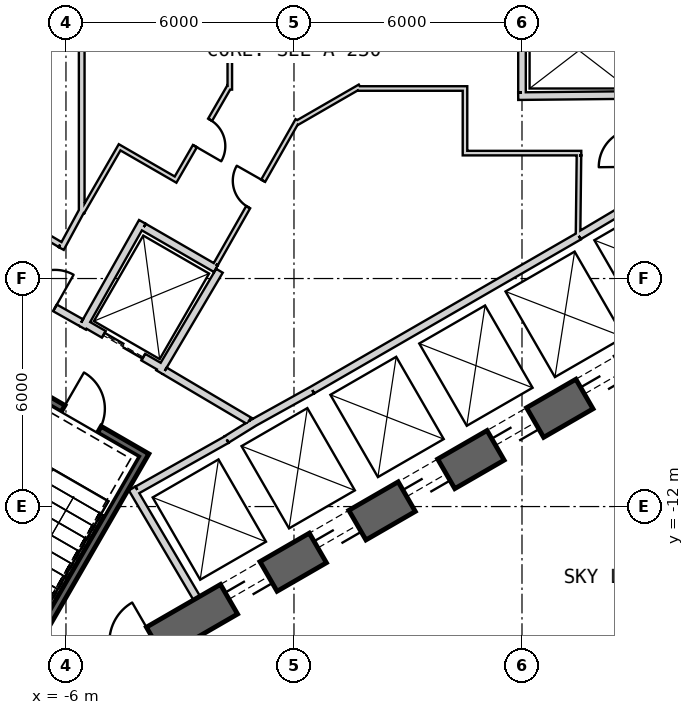
"""IFC4 building model, lengths in metres.
Left out: names, types, materials, properties, quantities, classifications, styles, units other than length and angle.
Written with IfcOpenShell. Run it as: python <this file> out.ifc"""

import sys

from ifc_helpers import new_model, si_unit, direction, frame, frame_2d, origin, place, context, subcontext, project, spatial, rectangle, extrude, element, fill, save


model = new_model("IFC4")
c1 = context("Model", 3, precision=1e-05, world=origin(), true_north=direction((0.0, 1.0)))
c2 = subcontext(c1, "Body", "Model", "MODEL_VIEW")
j1 = project(units=[si_unit("LENGTHUNIT", "METRE"), si_unit("PLANEANGLEUNIT", "RADIAN")], contexts=[c1])
p1 = place(None, origin())
s1 = spatial("IfcSite", under=j1, at=p1, CompositionType="ELEMENT")
p2 = place(p1, origin())
s2 = spatial("IfcBuilding", under=s1, at=p2, CompositionType="ELEMENT")
p3 = place(p2, frame((0.0, 0.0, 277.2)))
s3 = spatial("IfcBuildingStorey", under=s2, at=p3, CompositionType="ELEMENT", Elevation=277.2)
p4 = place(p3, frame((-7.825, -17.97, 0.0), z_axis=(0.0, 0.0, 1.0), x_axis=(0.866028369851, 0.499994862586, 0.0)))
e1 = element("IfcWall", 1, at=p4, inside=s3, PredefinedType="SHEAR", context=c2, shape_type="SweptSolid", body=[
    extrude(rectangle(XDim=31.523, YDim=0.9, at=frame_2d((15.762, 0.0))), origin(), (0.0, 0.0, 1.0), 6.5),
])
p5 = place(p4, frame((7.062, 0.0, 0.0)))
e2 = element("IfcOpeningElement", 2, at=p5, cuts=e1, PredefinedType="OPENING", context=c2, shape_type="SweptSolid", body=[
    extrude(rectangle(XDim=1.2, YDim=2.4, at=frame_2d((0.6, 1.2))), frame((0.0, 0.46, 0.0), z_axis=(0.0, -1.0, 0.0), x_axis=(1.0, 0.0, 0.0)), (0.0, 0.0, 1.0), 0.92),
])
p6 = place(p4, frame((9.762, 0.0, 0.0)))
e3 = element("IfcOpeningElement", 3, at=p6, cuts=e1, PredefinedType="OPENING", context=c2, shape_type="SweptSolid", body=[
    extrude(rectangle(XDim=1.2, YDim=2.4, at=frame_2d((0.6, 1.2))), frame((0.0, 0.46, 0.0), z_axis=(0.0, -1.0, 0.0), x_axis=(1.0, 0.0, 0.0)), (0.0, 0.0, 1.0), 0.92),
])
p7 = place(p4, frame((12.462, 0.0, 0.0)))
e4 = element("IfcOpeningElement", 4, at=p7, cuts=e1, PredefinedType="OPENING", context=c2, shape_type="SweptSolid", body=[
    extrude(rectangle(XDim=1.2, YDim=2.4, at=frame_2d((0.6, 1.2))), frame((0.0, 0.46, 0.0), z_axis=(0.0, -1.0, 0.0), x_axis=(1.0, 0.0, 0.0)), (0.0, 0.0, 1.0), 0.92),
])
p8 = place(p4, frame((15.162, 0.0, 0.0)))
e5 = element("IfcOpeningElement", 5, at=p8, cuts=e1, PredefinedType="OPENING", context=c2, shape_type="SweptSolid", body=[
    extrude(rectangle(XDim=1.2, YDim=2.4, at=frame_2d((0.6, 1.2))), frame((0.0, 0.46, 0.0), z_axis=(0.0, -1.0, 0.0), x_axis=(1.0, 0.0, 0.0)), (0.0, 0.0, 1.0), 0.92),
])
p9 = place(p4, frame((17.862, 0.0, 0.0)))
e6 = element("IfcOpeningElement", 6, at=p9, cuts=e1, PredefinedType="OPENING", context=c2, shape_type="SweptSolid", body=[
    extrude(rectangle(XDim=1.2, YDim=2.4, at=frame_2d((0.6, 1.2))), frame((0.0, 0.46, 0.0), z_axis=(0.0, -1.0, 0.0), x_axis=(1.0, 0.0, 0.0)), (0.0, 0.0, 1.0), 0.92),
])
p10 = place(p4, frame((20.562, 0.0, 0.0)))
e7 = element("IfcOpeningElement", 7, at=p10, cuts=e1, PredefinedType="OPENING", context=c2, shape_type="SweptSolid", body=[
    extrude(rectangle(XDim=1.2, YDim=2.4, at=frame_2d((0.6, 1.2))), frame((0.0, 0.46, 0.0), z_axis=(0.0, -1.0, 0.0), x_axis=(1.0, 0.0, 0.0)), (0.0, 0.0, 1.0), 0.92),
])
p11 = place(p4, frame((26.712, 0.0, 0.0)))
e8 = element("IfcOpeningElement", 8, at=p11, cuts=e1, PredefinedType="OPENING", context=c2, shape_type="SweptSolid", body=[
    extrude(rectangle(XDim=1.2, YDim=2.4, at=frame_2d((0.6, 1.2))), frame((0.0, 0.46, 0.0), z_axis=(0.0, -1.0, 0.0), x_axis=(1.0, 0.0, 0.0)), (0.0, 0.0, 1.0), 0.92),
])
p12 = place(p4, frame((3.612, 0.0, 0.0)))
e9 = element("IfcOpeningElement", 9, at=p12, cuts=e1, PredefinedType="OPENING", context=c2, shape_type="SweptSolid", body=[
    extrude(rectangle(XDim=1.2, YDim=2.4, at=frame_2d((0.6, 1.2))), frame((0.0, 0.46, 0.0), z_axis=(0.0, -1.0, 0.0), x_axis=(1.0, 0.0, 0.0)), (0.0, 0.0, 1.0), 0.92),
])
p13 = place(p3, frame((0.483, -8.936, 0.0), z_axis=(0.0, 0.0, 1.0), x_axis=(0.866030989016, 0.499990325971, 0.0)))
e10 = element("IfcWall", 10, at=p13, inside=s3, PredefinedType="PLUMBINGWALL", context=c2, shape_type="SweptSolid", body=[
    extrude(rectangle(XDim=8.1, YDim=0.2, at=frame_2d((4.05, 0.0))), origin(), (0.0, 0.0, 1.0), 6.1),
])
p14 = place(p3, frame((7.493, -4.878, 0.0), z_axis=(0.0, 0.0, 1.0), x_axis=(0.859981807212, 0.510324691999, 0.0)))
e11 = element("IfcWall", 11, at=p14, inside=s3, PredefinedType="PLUMBINGWALL", context=c2, shape_type="SweptSolid", body=[
    extrude(rectangle(XDim=1.845, YDim=0.2, at=frame_2d((0.922, 0.0))), origin(), (0.0, 0.0, 1.0), 6.1),
])
p15 = place(p3, frame((-2.558, -14.409, 0.0), z_axis=(0.0, 0.0, 1.0), x_axis=(-0.507997497166, 0.861358544901, 0.0)))
e12 = element("IfcWall", 12, at=p15, inside=s3, PredefinedType="PLUMBINGWALL", context=c2, shape_type="SweptSolid", body=[
    extrude(rectangle(XDim=3.35, YDim=0.2, at=frame_2d((1.675, 0.0))), origin(), (0.0, 0.0, 1.0), 6.1),
])
p16 = place(p3, frame((-1.769, -10.237, 0.0), z_axis=(0.0, 0.0, 1.0), x_axis=(-0.871534483978, -0.490334215854, 0.0)))
e13 = element("IfcWall", 13, at=p16, inside=s3, PredefinedType="PLUMBINGWALL", context=c2, shape_type="SweptSolid", body=[
    extrude(rectangle(XDim=2.7, YDim=0.2, at=frame_2d((1.35, 0.0))), origin(), (0.0, 0.0, 1.0), 6.1),
])
p17 = place(p3, frame((-1.024, -9.771, 0.0), z_axis=(0.0, 0.0, 1.0), x_axis=(-0.850348075135, -0.526220629693, 0.0)))
e14 = element("IfcWall", 14, at=p17, inside=s3, PredefinedType="PLUMBINGWALL", context=c2, shape_type="SweptSolid", body=[
    extrude(rectangle(XDim=0.878, YDim=0.2, at=frame_2d((0.439, 0.0))), origin(), (0.0, 0.0, 1.0), 6.1),
])
p18 = place(p3, frame((-1.13, -9.831, 0.0), z_axis=(0.0, 0.0, 1.0), x_axis=(0.874269620932, 0.485440655401, 0.0)))
e15 = element("IfcWall", 15, at=p18, inside=s3, PredefinedType="PLUMBINGWALL", context=c2, shape_type="SweptSolid", body=[
    extrude(rectangle(XDim=1.845, YDim=0.2, at=frame_2d((0.922, 0.0))), origin(), (0.0, 0.0, 1.0), 6.1),
])
p19 = place(p3, frame((5.9, -1.201, 0.0), z_axis=(0.0, 0.0, 1.0), x_axis=(0.999950064753, 0.009993397809, 0.0)))
e16 = element("IfcWall", 16, at=p19, inside=s3, PredefinedType="PLUMBINGWALL", context=c2, shape_type="SweptSolid", body=[
    extrude(rectangle(XDim=3.2, YDim=0.2, at=frame_2d((1.6, 0.0))), origin(), (0.0, 0.0, 1.0), 6.1),
])
p20 = place(p3, frame((6.0, -1.1, 0.0), z_axis=(0.0, 0.0, 1.0), x_axis=(0.0, 1.0, 0.0)))
e17 = element("IfcWall", 17, at=p20, inside=s3, PredefinedType="PLUMBINGWALL", context=c2, shape_type="SweptSolid", body=[
    extrude(rectangle(XDim=2.205, YDim=0.2, at=frame_2d((1.102, 0.0))), origin(), (0.0, 0.0, 1.0), 6.1),
])
p21 = place(p3, frame((-3.905, -10.563, -0.35), z_axis=(0.0, 0.0, 1.0), x_axis=(-0.500012932018, -0.866017937352, 0.0)))
e18 = element("IfcWall", 18, at=p21, inside=s3, PredefinedType="SHEAR", context=c2, shape_type="SweptSolid", body=[
    extrude(rectangle(XDim=8.1, YDim=0.2, at=frame_2d((4.05, 0.0))), origin(), (0.0, 0.0, 1.0), 6.45),
])
p22 = place(p3, frame((-4.041, -10.599, -0.35), z_axis=(0.0, 0.0, 1.0), x_axis=(-0.866047807691, 0.499961193289, 0.0)))
e19 = element("IfcWall", 19, at=p22, inside=s3, PredefinedType="SHEAR", context=c2, shape_type="SweptSolid", body=[
    extrude(rectangle(XDim=3.6, YDim=0.2, at=frame_2d((1.8, 0.0))), origin(), (0.0, 0.0, 1.0), 6.45),
])
p23 = place(p22, frame((1.25, 0.0, 0.35)))
e20 = element("IfcOpeningElement", 20, at=p23, cuts=e19, PredefinedType="OPENING", context=c2, shape_type="SweptSolid", body=[
    extrude(rectangle(XDim=1.1, YDim=2.1, at=frame_2d((0.55, 1.05))), frame((0.0, 0.11, 0.0), z_axis=(0.0, -1.0, 0.0), x_axis=(1.0, 0.0, 0.0)), (0.0, 0.0, 1.0), 0.22),
])
p24 = place(p3, frame((-3.446, -8.368, 0.0), z_axis=(0.0, 0.0, 1.0), x_axis=(-0.866024647952, 0.500001309137, 0.0)))
e21 = element("IfcWall", 21, at=p24, inside=s3, PredefinedType="PLUMBINGWALL", context=c2, shape_type="SweptSolid", body=[
    extrude(rectangle(XDim=2.4, YDim=0.2, at=frame_2d((1.2, 0.0))), origin(), (0.0, 0.0, 1.0), 6.1),
])
p25 = place(p24, frame((0.6, 0.0, 0.0)))
e22 = element("IfcOpeningElement", 22, at=p25, cuts=e21, PredefinedType="OPENING", context=c2, shape_type="SweptSolid", body=[
    extrude(rectangle(XDim=1.2, YDim=2.4, at=frame_2d((0.6, 1.2))), frame((0.0, 0.11, 0.0), z_axis=(0.0, -1.0, 0.0), x_axis=(1.0, 0.0, 0.0)), (0.0, 0.0, 1.0), 0.22),
])
p26 = place(p3, frame((-1.961, -5.796, 0.0), z_axis=(0.0, 0.0, 1.0), x_axis=(-0.508647062354, -0.860975125052, 0.0)))
e23 = element("IfcWall", 23, at=p26, inside=s3, PredefinedType="PLUMBINGWALL", context=c2, shape_type="SweptSolid", body=[
    extrude(rectangle(XDim=3.1, YDim=0.2, at=frame_2d((1.55, 0.0))), origin(), (0.0, 0.0, 1.0), 6.1),
])
p27 = place(p3, frame((-3.99, -4.509, 0.0), z_axis=(0.0, 0.0, 1.0), x_axis=(-0.491358283181, -0.870957540612, 0.0)))
e24 = element("IfcWall", 24, at=p27, inside=s3, PredefinedType="PLUMBINGWALL", context=c2, shape_type="SweptSolid", body=[
    extrude(rectangle(XDim=3.2, YDim=0.2, at=frame_2d((1.6, 0.0))), origin(), (0.0, 0.0, 1.0), 6.1),
])
p28 = place(p3, frame((-3.953, -4.646, 0.0), z_axis=(0.0, 0.0, 1.0), x_axis=(0.866038900241, -0.499976622722, 0.0)))
e25 = element("IfcWall", 25, at=p28, inside=s3, PredefinedType="PLUMBINGWALL", context=c2, shape_type="SweptSolid", body=[
    extrude(rectangle(XDim=2.189, YDim=0.2, at=frame_2d((1.095, 0.0))), origin(), (0.0, 0.0, 1.0), 6.1),
])
p29 = place(p3, frame((-3.401, -8.43, 0.0), z_axis=(0.0, 0.0, 1.0), x_axis=(0.860615607571, -0.509255118781, 0.0)))
e26 = element("IfcWall", 26, at=p29, inside=s3, PredefinedType="PARTITIONING", context=c2, shape_type="SweptSolid", body=[
    extrude(rectangle(XDim=2.581, YDim=0.2, at=frame_2d((1.29, 0.0))), origin(), (0.0, 0.0, 1.0), 6.1),
])
p30 = place(p3, frame((-7.849, -5.894, 0.0), z_axis=(0.0, 0.0, 1.0), x_axis=(0.871363259478, -0.490638431059, 0.0)))
e27 = element("IfcWall", 27, at=p30, inside=s3, PredefinedType="PARTITIONING", context=c2, shape_type="SweptSolid", body=[
    extrude(rectangle(XDim=2.581, YDim=0.2, at=frame_2d((1.291, 0.0))), origin(), (0.0, 0.0, 1.0), 6.1),
])
p31 = place(p30, frame((0.791, 0.0, 0.0)))
e28 = element("IfcOpeningElement", 28, at=p31, cuts=e27, PredefinedType="OPENING", context=c2, shape_type="SweptSolid", body=[
    extrude(rectangle(XDim=1.0, YDim=2.1, at=frame_2d((0.5, 1.05))), frame((0.0, 0.11, 0.0), z_axis=(0.0, -1.0, 0.0), x_axis=(1.0, 0.0, 0.0)), (0.0, 0.0, 1.0), 0.22),
])
p32 = place(p3, frame((0.094, -1.836, 0.0), z_axis=(0.0, 0.0, 1.0), x_axis=(-0.494097972448, -0.869406230495, 0.0)))
e29 = element("IfcWall", 29, at=p32, inside=s3, PredefinedType="PARTITIONING", context=c2, shape_type="SweptSolid", body=[
    extrude(rectangle(XDim=4.357, YDim=0.12, at=frame_2d((2.179, 0.0))), origin(), (0.0, 0.0, 1.0), 6.1),
])
p33 = place(p32, frame((1.83, 0.0, 0.0)))
e30 = element("IfcOpeningElement", 30, at=p33, cuts=e29, PredefinedType="OPENING", context=c2, shape_type="SweptSolid", body=[
    extrude(rectangle(XDim=0.8, YDim=2.1, at=frame_2d((0.4, 1.05))), frame((0.0, 0.07, 0.0), z_axis=(0.0, -1.0, 0.0), x_axis=(1.0, 0.0, 0.0)), (0.0, 0.0, 1.0), 0.14),
])
p34 = place(p3, frame((1.735, -0.948, 0.0), z_axis=(0.0, 0.0, 1.0), x_axis=(-0.866021702275, -0.500006411147, 0.0)))
e31 = element("IfcWall", 31, at=p34, inside=s3, PredefinedType="PARTITIONING", context=c2, shape_type="SweptSolid", body=[
    extrude(rectangle(XDim=1.935, YDim=0.12, at=frame_2d((0.968, 0.0))), origin(), (0.0, 0.0, 1.0), 6.1),
])
p35 = place(p3, frame((4.56, -1.0, 0.0), z_axis=(0.0, 0.0, 1.0), x_axis=(-1.0, 0.0, 0.0)))
e32 = element("IfcWall", 32, at=p35, inside=s3, PredefinedType="PARTITIONING", context=c2, shape_type="SweptSolid", body=[
    extrude(rectangle(XDim=2.896, YDim=0.12, at=frame_2d((1.448, 0.0))), origin(), (0.0, 0.0, 1.0), 6.1),
])
p36 = place(p3, frame((4.5, -2.76, 0.0), z_axis=(0.0, 0.0, 1.0), x_axis=(0.0, 1.0, 0.0)))
e33 = element("IfcWall", 33, at=p36, inside=s3, PredefinedType="PARTITIONING", context=c2, shape_type="SweptSolid", body=[
    extrude(rectangle(XDim=1.7, YDim=0.12, at=frame_2d((0.85, 0.0))), origin(), (0.0, 0.0, 1.0), 6.1),
])
p37 = place(p3, frame((7.56, -2.7, 0.0), z_axis=(0.0, 0.0, 1.0), x_axis=(-1.0, 0.0, 0.0)))
e34 = element("IfcWall", 34, at=p37, inside=s3, PredefinedType="PARTITIONING", context=c2, shape_type="SweptSolid", body=[
    extrude(rectangle(XDim=3.0, YDim=0.12, at=frame_2d((1.5, 0.0))), origin(), (0.0, 0.0, 1.0), 6.1),
])
p38 = place(p3, frame((7.475, -4.865, 0.0), z_axis=(0.0, 0.0, 1.0), x_axis=(0.011716133148, 0.999931363757, 0.0)))
e35 = element("IfcWall", 35, at=p38, inside=s3, PredefinedType="PARTITIONING", context=c2, shape_type="SweptSolid", body=[
    extrude(rectangle(XDim=2.105, YDim=0.12, at=frame_2d((1.052, 0.0))), origin(), (0.0, 0.0, 1.0), 6.1),
])
p39 = place(p3, frame((-5.586, -4.275, 0.0), z_axis=(0.0, 0.0, 1.0), x_axis=(0.0, 1.0, 0.0)))
e36 = element("IfcWall", 36, at=p39, inside=s3, PredefinedType="PLUMBINGWALL", context=c2, shape_type="SweptSolid", body=[
    extrude(rectangle(XDim=8.549, YDim=0.15, at=frame_2d((4.275, 0.0))), origin(), (0.0, 0.0, 1.0), 6.1),
])
p40 = place(p3, frame((-6.124, -5.211, 0.0), z_axis=(0.0, 0.0, 1.0), x_axis=(0.476228984866, 0.879321303036, 0.0)))
e37 = element("IfcWall", 37, at=p40, inside=s3, PredefinedType="PLUMBINGWALL", context=c2, shape_type="SweptSolid", body=[
    extrude(rectangle(XDim=1.162, YDim=0.15, at=frame_2d((0.581, 0.0))), origin(), (0.0, 0.0, 1.0), 6.1),
])
p41 = place(p3, frame((-7.95, -4.041, 0.0), z_axis=(0.0, 0.0, 1.0), x_axis=(0.860090281069, -0.510141851263, 0.0)))
e38 = element("IfcWall", 38, at=p41, inside=s3, PredefinedType="PLUMBINGWALL", context=c2, shape_type="SweptSolid", body=[
    extrude(rectangle(XDim=2.089, YDim=0.15, at=frame_2d((1.045, 0.0))), origin(), (0.0, 0.0, 1.0), 6.1),
])
p42 = place(p3, frame((-1.689, -1.029, 0.0), z_axis=(0.0, 0.0, 1.0), x_axis=(0.0, 1.0, 0.0)))
e39 = element("IfcWall", 39, at=p42, inside=s3, PredefinedType="PARTITIONING", context=c2, shape_type="SweptSolid", body=[
    extrude(rectangle(XDim=1.935, YDim=0.12, at=frame_2d((0.968, 0.0))), origin(), (0.0, 0.0, 1.0), 6.1),
])
p43 = place(p3, frame((-3.146, -3.449, 0.0), z_axis=(0.0, 0.0, 1.0), x_axis=(0.500028961621, 0.866008682139, 0.0)))
e40 = element("IfcWall", 40, at=p43, inside=s3, PredefinedType="PARTITIONING", context=c2, shape_type="SweptSolid", body=[
    extrude(rectangle(XDim=2.896, YDim=0.12, at=frame_2d((1.448, 0.0))), origin(), (0.0, 0.0, 1.0), 6.1),
])
p44 = place(p43, frame((1.078, 0.0, 0.0)))
e41 = element("IfcOpeningElement", 41, at=p44, cuts=e40, PredefinedType="OPENING", context=c2, shape_type="SweptSolid", body=[
    extrude(rectangle(XDim=0.8, YDim=2.1, at=frame_2d((0.4, 1.05))), frame((0.0, 0.07, 0.0), z_axis=(0.0, -1.0, 0.0), x_axis=(1.0, 0.0, 0.0)), (0.0, 0.0, 1.0), 0.14),
])
p45 = place(p3, frame((-4.64, -2.517, 0.0), z_axis=(0.0, 0.0, 1.0), x_axis=(0.865989465428, -0.500062241894, 0.0)))
e42 = element("IfcWall", 42, at=p45, inside=s3, PredefinedType="PARTITIONING", context=c2, shape_type="SweptSolid", body=[
    extrude(rectangle(XDim=1.7, YDim=0.12, at=frame_2d((0.85, 0.0))), origin(), (0.0, 0.0, 1.0), 6.1),
])
p46 = place(p3, frame((-5.571, -4.249, 0.0), z_axis=(0.0, 0.0, 1.0), x_axis=(0.500081145431, 0.865978549379, 0.0)))
e43 = element("IfcWall", 43, at=p46, inside=s3, PredefinedType="PARTITIONING", context=c2, shape_type="SweptSolid", body=[
    extrude(rectangle(XDim=1.905, YDim=0.12, at=frame_2d((0.953, 0.0))), origin(), (0.0, 0.0, 1.0), 6.1),
])
p47 = place(p3, frame((-4.595, -27.017, 0.0), z_axis=(0.0, 0.0, 1.0), x_axis=(0.866023879948, 0.500002639353, 0.0)))
e44 = element("IfcWall", 44, at=p47, inside=s3, PredefinedType="PARTITIONING", context=c2, shape_type="SweptSolid", body=[
    extrude(rectangle(XDim=26.097, YDim=0.12, at=frame_2d((13.049, 0.0))), origin(), (0.0, 0.0, 1.0), 6.1),
])
p48 = place(p47, frame((19.96, 0.0, 0.0)))
e45 = element("IfcOpeningElement", 45, at=p48, cuts=e44, PredefinedType="OPENING", context=c2, shape_type="SweptSolid", body=[
    extrude(rectangle(XDim=1.8, YDim=2.1, at=frame_2d((0.9, 1.05))), frame((0.0, 0.07, 0.0), z_axis=(0.0, -1.0, 0.0), x_axis=(1.0, 0.0, 0.0)), (0.0, 0.0, 1.0), 0.14),
])
p49 = place(p23, origin())
e46 = element("IfcDoor", 46, at=p49, inside=s3, OperationType="SINGLE_SWING_RIGHT", PredefinedType="USERDEFINED", context=c2, shape_type="SweptSolid", body=[
    extrude(rectangle(XDim=1.1, YDim=2.1, at=frame_2d((0.55, 1.05))), frame((0.0, 0.025, 0.0), z_axis=(0.0, -1.0, 0.0), x_axis=(1.0, 0.0, 0.0)), (0.0, 0.0, 1.0), 0.05),
])
fill(e20, e46)
p50 = place(p31, origin())
e47 = element("IfcDoor", 47, at=p50, inside=s3, OperationType="SINGLE_SWING_RIGHT", PredefinedType="USERDEFINED", context=c2, shape_type="SweptSolid", body=[
    extrude(rectangle(XDim=1.0, YDim=2.1, at=frame_2d((0.5, 1.05))), frame((0.0, 0.025, 0.0), z_axis=(0.0, -1.0, 0.0), x_axis=(1.0, 0.0, 0.0)), (0.0, 0.0, 1.0), 0.05),
])
fill(e28, e47)
p51 = place(p25, origin())
e48 = element("IfcDoor", 48, at=p51, inside=s3, OperationType="SLIDING_TO_LEFT", PredefinedType="USERDEFINED", context=c2, shape_type="SweptSolid", body=[
    extrude(rectangle(XDim=1.2, YDim=2.4, at=frame_2d((0.6, 1.2))), frame((0.0, 0.025, 0.0), z_axis=(0.0, -1.0, 0.0), x_axis=(1.0, 0.0, 0.0)), (0.0, 0.0, 1.0), 0.05),
])
fill(e22, e48)
p52 = place(p33, origin())
e49 = element("IfcDoor", 49, at=p52, inside=s3, OperationType="SINGLE_SWING_LEFT", PredefinedType="USERDEFINED", context=c2, shape_type="SweptSolid", body=[
    extrude(rectangle(XDim=0.8, YDim=2.1, at=frame_2d((0.4, 1.05))), frame((0.0, 0.025, 0.0), z_axis=(0.0, -1.0, 0.0), x_axis=(1.0, 0.0, 0.0)), (0.0, 0.0, 1.0), 0.05),
])
fill(e30, e49)
p53 = place(p44, origin())
e50 = element("IfcDoor", 50, at=p53, inside=s3, OperationType="SINGLE_SWING_LEFT", PredefinedType="USERDEFINED", context=c2, shape_type="SweptSolid", body=[
    extrude(rectangle(XDim=0.8, YDim=2.1, at=frame_2d((0.4, 1.05))), frame((0.0, 0.025, 0.0), z_axis=(0.0, -1.0, 0.0), x_axis=(1.0, 0.0, 0.0)), (0.0, 0.0, 1.0), 0.05),
])
fill(e41, e50)
p54 = place(p5, origin())
e51 = element("IfcDoor", 51, at=p54, inside=s3, OperationType="SLIDING_TO_LEFT", PredefinedType="USERDEFINED", context=c2, shape_type="SweptSolid", body=[
    extrude(rectangle(XDim=1.2, YDim=2.4, at=frame_2d((0.6, 1.2))), frame((0.0, 0.025, 0.0), z_axis=(0.0, -1.0, 0.0), x_axis=(1.0, 0.0, 0.0)), (0.0, 0.0, 1.0), 0.05),
])
fill(e2, e51)
p55 = place(p6, origin())
e52 = element("IfcDoor", 52, at=p55, inside=s3, OperationType="SLIDING_TO_LEFT", PredefinedType="USERDEFINED", context=c2, shape_type="SweptSolid", body=[
    extrude(rectangle(XDim=1.2, YDim=2.4, at=frame_2d((0.6, 1.2))), frame((0.0, 0.025, 0.0), z_axis=(0.0, -1.0, 0.0), x_axis=(1.0, 0.0, 0.0)), (0.0, 0.0, 1.0), 0.05),
])
fill(e3, e52)
p56 = place(p7, origin())
e53 = element("IfcDoor", 53, at=p56, inside=s3, OperationType="SLIDING_TO_LEFT", PredefinedType="USERDEFINED", context=c2, shape_type="SweptSolid", body=[
    extrude(rectangle(XDim=1.2, YDim=2.4, at=frame_2d((0.6, 1.2))), frame((0.0, 0.025, 0.0), z_axis=(0.0, -1.0, 0.0), x_axis=(1.0, 0.0, 0.0)), (0.0, 0.0, 1.0), 0.05),
])
fill(e4, e53)
p57 = place(p8, origin())
e54 = element("IfcDoor", 54, at=p57, inside=s3, OperationType="SLIDING_TO_LEFT", PredefinedType="USERDEFINED", context=c2, shape_type="SweptSolid", body=[
    extrude(rectangle(XDim=1.2, YDim=2.4, at=frame_2d((0.6, 1.2))), frame((0.0, 0.025, 0.0), z_axis=(0.0, -1.0, 0.0), x_axis=(1.0, 0.0, 0.0)), (0.0, 0.0, 1.0), 0.05),
])
fill(e5, e54)
p58 = place(p9, origin())
e55 = element("IfcDoor", 55, at=p58, inside=s3, OperationType="SLIDING_TO_LEFT", PredefinedType="USERDEFINED", context=c2, shape_type="SweptSolid", body=[
    extrude(rectangle(XDim=1.2, YDim=2.4, at=frame_2d((0.6, 1.2))), frame((0.0, 0.025, 0.0), z_axis=(0.0, -1.0, 0.0), x_axis=(1.0, 0.0, 0.0)), (0.0, 0.0, 1.0), 0.05),
])
fill(e6, e55)
save(model, sys.argv[1])
